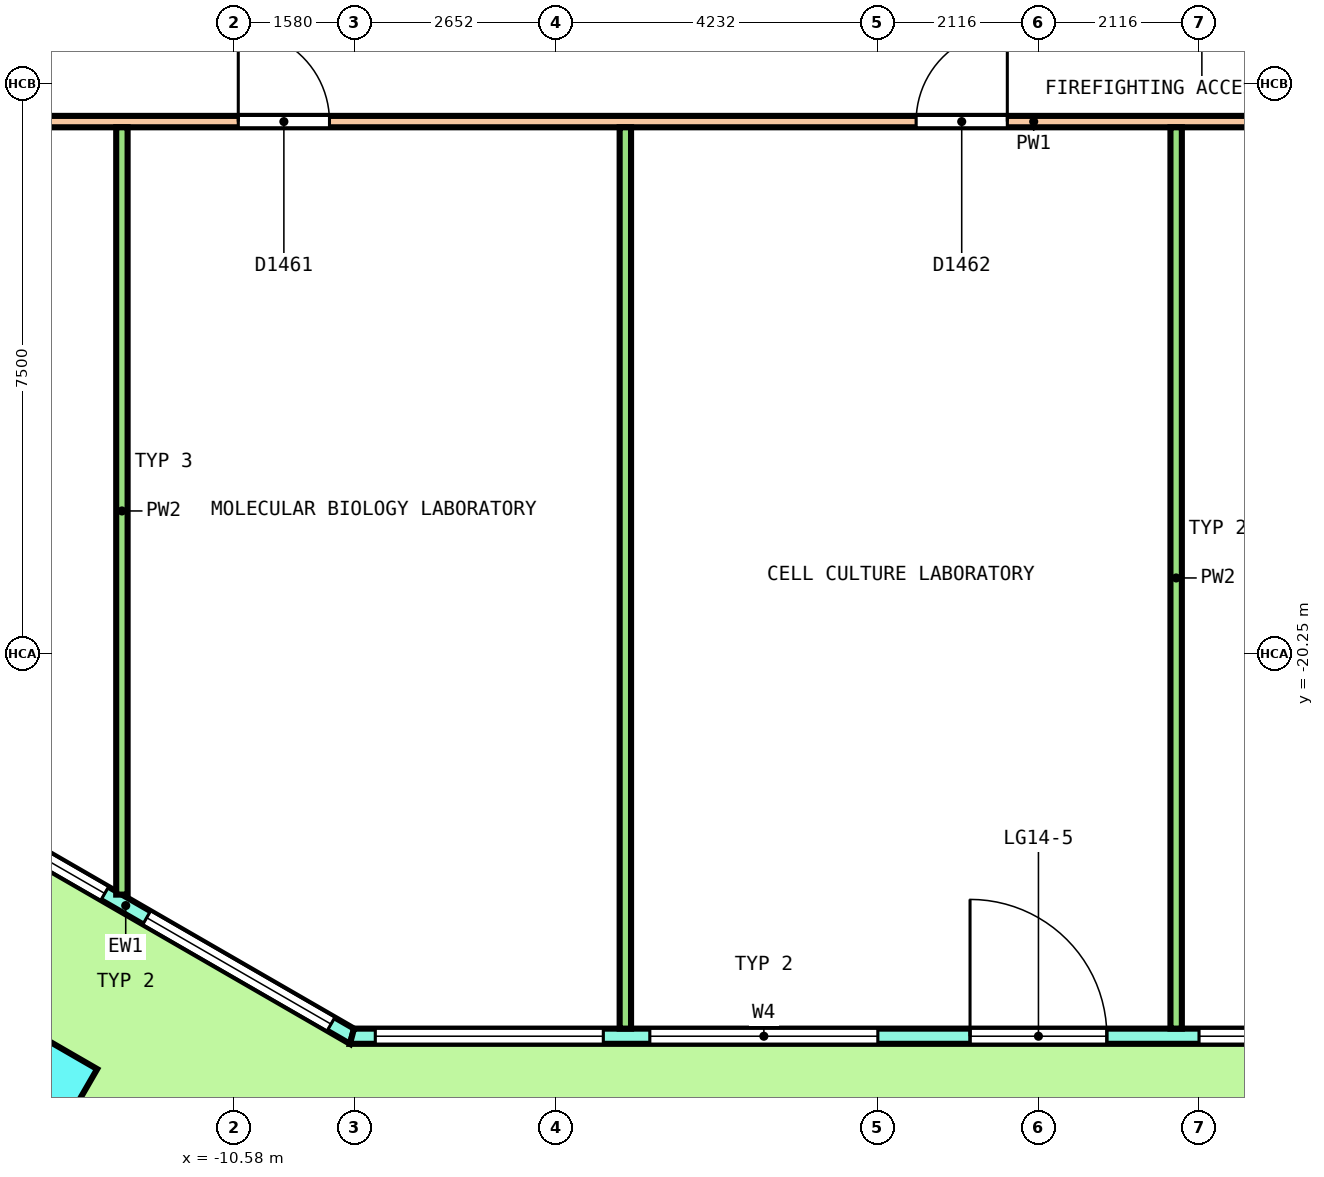
"""IFC4 building model, lengths in metres.
Left out: names, types, materials, properties, quantities, classifications, styles, units other than length and angle.
Written with IfcOpenShell. Run it as: python <this file> out.ifc"""

import sys

from ifc_helpers import new_model, si_unit, direction, frame, frame_2d, origin, origin_2d, place, context, subcontext, project, spatial, polyline, rectangle, outline, extrude, element, fill, save


model = new_model("IFC4")
c1 = context("Model", 3, precision=1e-05, world=origin(), true_north=direction((0.0, 1.0)))
c2 = subcontext(c1, "Body", "Model", "MODEL_VIEW")
j1 = project(units=[si_unit("LENGTHUNIT", "METRE"), si_unit("PLANEANGLEUNIT", "RADIAN")], contexts=[c1])
p1 = place(None, origin())
s1 = spatial("IfcSite", under=j1, at=p1, CompositionType="ELEMENT")
p2 = place(p1, origin())
s2 = spatial("IfcBuilding", under=s1, at=p2, CompositionType="ELEMENT")
p3 = place(p2, frame((0.0, 0.0, 63.0)))
s3 = spatial("IfcBuildingStorey", under=s2, at=p3, CompositionType="ELEMENT", Elevation=63.0)
p4 = place(p3, frame((-13.408, -25.989, 0.0), z_axis=(0.0, 0.0, 1.0), x_axis=(0.866025403784, -0.5, 0.0)))
e1 = element("IfcColumn", 1, at=p4, inside=s3, PredefinedType="COLUMN", context=c2, shape_type="SweptSolid", body=[
    extrude(rectangle(XDim=1.5, YDim=1.5, at=origin_2d()), origin(), (0.0, 0.0, 1.0), 4.04),
])
p5 = place(p3, frame((-14.985, -21.845, 0.0), z_axis=(0.0, 0.0, 1.0), x_axis=(0.866029458321, -0.49999297727, 0.0)))
e2 = element("IfcWall", 2, at=p5, inside=s3, PredefinedType="SOLIDWALL", context=c2, shape_type="SweptSolid", body=[
    extrude(outline(polyline([(-0.027, -0.1), (1.128, -0.1), (2.282, -0.1), (3.437, -0.1), (4.592, -0.1), (5.747, -0.1), (6.901, -0.1), (6.848, 0.1), (5.711, 0.1), (4.574, 0.1), (3.437, 0.1), (2.301, 0.1), (1.164, 0.1), (0.027, 0.1), (-0.027, -0.1)])), origin(), (0.0, 0.0, 1.0), 4.1),
])
p6 = place(p5, frame((0.319, 0.0, 0.1)))
e3 = element("IfcOpeningElement", 3, at=p6, cuts=e2, PredefinedType="OPENING", context=c2, shape_type="SweptSolid", body=[
    extrude(rectangle(XDim=2.8, YDim=2.9, at=frame_2d((1.4, 1.45))), frame((0.0, 0.11, 0.0), z_axis=(0.0, -1.0, 0.0), x_axis=(1.0, 0.0, 0.0)), (0.0, 0.0, 1.0), 0.22),
])
p7 = place(p5, frame((3.756, 0.0, 0.1)))
e4 = element("IfcOpeningElement", 4, at=p7, cuts=e2, PredefinedType="OPENING", context=c2, shape_type="SweptSolid", body=[
    extrude(rectangle(XDim=2.8, YDim=2.9, at=frame_2d((1.4, 1.45))), frame((0.0, 0.11, 0.0), z_axis=(0.0, -1.0, 0.0), x_axis=(1.0, 0.0, 0.0)), (0.0, 0.0, 1.0), 0.22),
])
p8 = place(p3, frame((-9.031, -25.283, 0.0), z_axis=(0.0, 0.0, 1.0), x_axis=(1.0, 0.0, 0.0)))
e5 = element("IfcWall", 5, at=p8, inside=s3, PredefinedType="SOLIDWALL", context=c2, shape_type="SweptSolid", body=[
    extrude(outline(polyline([(-0.027, -0.1), (0.979, -0.1), (1.986, -0.1), (2.992, -0.1), (3.999, -0.1), (5.005, -0.1), (6.012, -0.1), (7.018, -0.1), (8.025, -0.1), (9.031, -0.1), (10.038, -0.1), (11.044, -0.1), (12.051, -0.1), (13.057, -0.1), (14.063, -0.1), (15.07, -0.1), (16.076, -0.1), (17.083, -0.1), (18.089, -0.1), (18.036, 0.1), (17.035, 0.1), (16.035, 0.1), (15.034, 0.1), (14.034, 0.1), (13.033, 0.1), (12.033, 0.1), (11.032, 0.1), (10.032, 0.1), (9.031, 0.1), (8.031, 0.1), (7.03, 0.1), (6.03, 0.1), (5.029, 0.1), (4.029, 0.1), (3.028, 0.1), (2.028, 0.1), (1.027, 0.1), (0.027, 0.1), (-0.027, -0.1)])), origin(), (0.0, 0.0, 1.0), 4.1),
])
p9 = place(p8, frame((0.306, 0.0, 0.1)))
e6 = element("IfcOpeningElement", 6, at=p9, cuts=e5, PredefinedType="OPENING", context=c2, shape_type="SweptSolid", body=[
    extrude(rectangle(XDim=3.0, YDim=2.9, at=frame_2d((1.5, 1.45))), frame((0.0, 0.11, 0.0), z_axis=(0.0, -1.0, 0.0), x_axis=(1.0, 0.0, 0.0)), (0.0, 0.0, 1.0), 0.22),
])
p10 = place(p8, frame((3.919, 0.0, 0.1)))
e7 = element("IfcOpeningElement", 7, at=p10, cuts=e5, PredefinedType="OPENING", context=c2, shape_type="SweptSolid", body=[
    extrude(rectangle(XDim=3.0, YDim=2.9, at=frame_2d((1.5, 1.45))), frame((0.0, 0.11, 0.0), z_axis=(0.0, -1.0, 0.0), x_axis=(1.0, 0.0, 0.0)), (0.0, 0.0, 1.0), 0.22),
])
p11 = place(p8, frame((8.131, 0.0, 0.0)))
e8 = element("IfcOpeningElement", 8, at=p11, cuts=e5, PredefinedType="OPENING", context=c2, shape_type="SweptSolid", body=[
    extrude(rectangle(XDim=1.8, YDim=2.4, at=frame_2d((0.9, 1.2))), frame((0.0, 0.11, 0.0), z_axis=(0.0, -1.0, 0.0), x_axis=(1.0, 0.0, 0.0)), (0.0, 0.0, 1.0), 0.22),
])
p12 = place(p8, frame((8.131, 0.0, 2.55)))
e9 = element("IfcOpeningElement", 9, at=p12, cuts=e5, PredefinedType="OPENING", context=c2, shape_type="SweptSolid", body=[
    extrude(rectangle(XDim=1.8, YDim=0.45, at=frame_2d((0.9, 0.225))), frame((0.0, 0.11, 0.0), z_axis=(0.0, -1.0, 0.0), x_axis=(1.0, 0.0, 0.0)), (0.0, 0.0, 1.0), 0.22),
])
p13 = place(p8, frame((11.144, 0.0, 0.1)))
e10 = element("IfcOpeningElement", 10, at=p13, cuts=e5, PredefinedType="OPENING", context=c2, shape_type="SweptSolid", body=[
    extrude(rectangle(XDim=3.0, YDim=2.9, at=frame_2d((1.5, 1.45))), frame((0.0, 0.11, 0.0), z_axis=(0.0, -1.0, 0.0), x_axis=(1.0, 0.0, 0.0)), (0.0, 0.0, 1.0), 0.22),
])
p14 = place(p8, frame((14.756, 0.0, 0.1)))
e11 = element("IfcOpeningElement", 11, at=p14, cuts=e5, PredefinedType="OPENING", context=c2, shape_type="SweptSolid", body=[
    extrude(rectangle(XDim=3.0, YDim=2.9, at=frame_2d((1.5, 1.45))), frame((0.0, 0.11, 0.0), z_axis=(0.0, -1.0, 0.0), x_axis=(1.0, 0.0, 0.0)), (0.0, 0.0, 1.0), 0.22),
])
p15 = place(p3, frame((-15.725, -13.25, 0.0), z_axis=(0.0, 0.0, 1.0), x_axis=(1.0, 0.0, 0.0)))
e12 = element("IfcWall", 12, at=p15, inside=s3, PredefinedType="PARTITIONING", context=c2, shape_type="SweptSolid", body=[
    extrude(rectangle(XDim=31.325, YDim=0.15, at=frame_2d((15.663, 0.0))), origin(), (0.0, 0.0, 1.0), 3.05),
])
p16 = place(p15, frame((0.898, 0.0, 0.0)))
e13 = element("IfcOpeningElement", 13, at=p16, cuts=e12, PredefinedType="OPENING", context=c2, shape_type="SweptSolid", body=[
    extrude(rectangle(XDim=1.0, YDim=2.1, at=frame_2d((0.5, 1.05))), frame((0.0, 0.085, 0.0), z_axis=(0.0, -1.0, 0.0), x_axis=(1.0, 0.0, 0.0)), (0.0, 0.0, 1.0), 0.17),
])
p17 = place(p15, frame((5.198, 0.0, 0.0)))
e14 = element("IfcOpeningElement", 14, at=p17, cuts=e12, PredefinedType="OPENING", context=c2, shape_type="SweptSolid", body=[
    extrude(rectangle(XDim=1.2, YDim=2.1, at=frame_2d((0.6, 1.05))), frame((0.0, 0.085, 0.0), z_axis=(0.0, -1.0, 0.0), x_axis=(1.0, 0.0, 0.0)), (0.0, 0.0, 1.0), 0.17),
])
p18 = place(p15, frame((14.115, 0.0, 0.0)))
e15 = element("IfcOpeningElement", 15, at=p18, cuts=e12, PredefinedType="OPENING", context=c2, shape_type="SweptSolid", body=[
    extrude(rectangle(XDim=1.2, YDim=2.1, at=frame_2d((0.6, 1.05))), frame((0.0, 0.085, 0.0), z_axis=(0.0, -1.0, 0.0), x_axis=(1.0, 0.0, 0.0)), (0.0, 0.0, 1.0), 0.17),
])
p19 = place(p15, frame((22.046, 0.0, 0.0)))
e16 = element("IfcOpeningElement", 16, at=p19, cuts=e12, PredefinedType="OPENING", context=c2, shape_type="SweptSolid", body=[
    extrude(rectangle(XDim=1.0, YDim=2.1, at=frame_2d((0.5, 1.05))), frame((0.0, 0.085, 0.0), z_axis=(0.0, -1.0, 0.0), x_axis=(1.0, 0.0, 0.0)), (0.0, 0.0, 1.0), 0.17),
])
p20 = place(p15, frame((28.358, 0.0, 0.0)))
e17 = element("IfcOpeningElement", 17, at=p20, cuts=e12, PredefinedType="OPENING", context=c2, shape_type="SweptSolid", body=[
    extrude(rectangle(XDim=1.0, YDim=2.1, at=frame_2d((0.5, 1.05))), frame((0.0, 0.085, 0.0), z_axis=(0.0, -1.0, 0.0), x_axis=(1.0, 0.0, 0.0)), (0.0, 0.0, 1.0), 0.17),
])
p21 = place(p3, frame((-12.058, -23.42, 0.0), z_axis=(0.0, 0.0, 1.0), x_axis=(0.0, 1.0, 0.0)))
e18 = element("IfcWall", 18, at=p21, inside=s3, PredefinedType="PARTITIONING", context=c2, shape_type="SweptSolid", body=[
    extrude(rectangle(XDim=10.095, YDim=0.15, at=frame_2d((5.047, 0.0))), origin(), (0.0, 0.0, 1.0), 3.05),
])
for number, where, z_axis, x_axis in (
    (19, (-5.435, -25.183, 0.0), (0.0, 0.0, 1.0), (0.0, 1.0, 0.0)),
    (20, (1.812, -25.183, 0.0), (0.0, 0.0, 1.0), (0.0, 1.0, 0.0)),
):
    element("IfcWall", number, at=place(p3, frame(where, z_axis=z_axis, x_axis=x_axis)), inside=s3, PredefinedType="PARTITIONING", context=c2, shape_type="SweptSolid", body=[
        extrude(rectangle(XDim=11.858, YDim=0.15, at=frame_2d((5.929, 0.0))), origin(), (0.0, 0.0, 1.0), 3.05),
    ])
p22 = place(p6, origin())
e21 = element("IfcWindow", 21, at=p22, inside=s3, PartitioningType="SINGLE_PANEL", PredefinedType="WINDOW", context=c2, shape_type="SweptSolid", body=[
    extrude(rectangle(XDim=2.8, YDim=2.9, at=frame_2d((1.4, 1.45))), frame((0.0, 0.03, 0.0), z_axis=(0.0, -1.0, 0.0), x_axis=(1.0, 0.0, 0.0)), (0.0, 0.0, 1.0), 0.06),
])
fill(e3, e21)
p23 = place(p7, origin())
e22 = element("IfcWindow", 22, at=p23, inside=s3, PartitioningType="SINGLE_PANEL", PredefinedType="WINDOW", context=c2, shape_type="SweptSolid", body=[
    extrude(rectangle(XDim=2.8, YDim=2.9, at=frame_2d((1.4, 1.45))), frame((0.0, 0.03, 0.0), z_axis=(0.0, -1.0, 0.0), x_axis=(1.0, 0.0, 0.0)), (0.0, 0.0, 1.0), 0.06),
])
fill(e4, e22)
p24 = place(p9, origin())
e23 = element("IfcWindow", 23, at=p24, inside=s3, PartitioningType="SINGLE_PANEL", PredefinedType="WINDOW", context=c2, shape_type="SweptSolid", body=[
    extrude(rectangle(XDim=3.0, YDim=2.9, at=frame_2d((1.5, 1.45))), frame((0.0, 0.03, 0.0), z_axis=(0.0, -1.0, 0.0), x_axis=(1.0, 0.0, 0.0)), (0.0, 0.0, 1.0), 0.06),
])
fill(e6, e23)
p25 = place(p10, origin())
e24 = element("IfcWindow", 24, at=p25, inside=s3, PartitioningType="SINGLE_PANEL", PredefinedType="WINDOW", context=c2, shape_type="SweptSolid", body=[
    extrude(rectangle(XDim=3.0, YDim=2.9, at=frame_2d((1.5, 1.45))), frame((0.0, 0.03, 0.0), z_axis=(0.0, -1.0, 0.0), x_axis=(1.0, 0.0, 0.0)), (0.0, 0.0, 1.0), 0.06),
])
fill(e7, e24)
p26 = place(p11, origin())
e25 = element("IfcDoor", 25, at=p26, inside=s3, OperationType="DOUBLE_DOOR_SINGLE_SWING", PredefinedType="DOOR", context=c2, shape_type="SweptSolid", body=[
    extrude(rectangle(XDim=1.8, YDim=2.4, at=frame_2d((0.9, 1.2))), frame((0.0, 0.025, 0.0), z_axis=(0.0, -1.0, 0.0), x_axis=(1.0, 0.0, 0.0)), (0.0, 0.0, 1.0), 0.05),
])
fill(e8, e25)
p27 = place(p12, origin())
e26 = element("IfcWindow", 26, at=p27, inside=s3, PartitioningType="SINGLE_PANEL", PredefinedType="WINDOW", context=c2, shape_type="SweptSolid", body=[
    extrude(rectangle(XDim=1.8, YDim=0.45, at=frame_2d((0.9, 0.225))), frame((0.0, 0.03, 0.0), z_axis=(0.0, -1.0, 0.0), x_axis=(1.0, 0.0, 0.0)), (0.0, 0.0, 1.0), 0.06),
])
fill(e9, e26)
p28 = place(p13, origin())
e27 = element("IfcWindow", 27, at=p28, inside=s3, PartitioningType="SINGLE_PANEL", PredefinedType="WINDOW", context=c2, shape_type="SweptSolid", body=[
    extrude(rectangle(XDim=3.0, YDim=2.9, at=frame_2d((1.5, 1.45))), frame((0.0, 0.03, 0.0), z_axis=(0.0, -1.0, 0.0), x_axis=(1.0, 0.0, 0.0)), (0.0, 0.0, 1.0), 0.06),
])
fill(e10, e27)
p29 = place(p17, origin())
e28 = element("IfcDoor", 28, at=p29, inside=s3, OperationType="DOUBLE_DOOR_SINGLE_SWING", PredefinedType="DOOR", context=c2, shape_type="SweptSolid", body=[
    extrude(rectangle(XDim=1.2, YDim=2.1, at=frame_2d((0.6, 1.05))), frame((0.0, 0.025, 0.0), z_axis=(0.0, -1.0, 0.0), x_axis=(1.0, 0.0, 0.0)), (0.0, 0.0, 1.0), 0.05),
])
fill(e14, e28)
p30 = place(p18, origin())
e29 = element("IfcDoor", 29, at=p30, inside=s3, OperationType="DOUBLE_DOOR_SINGLE_SWING", PredefinedType="DOOR", context=c2, shape_type="SweptSolid", body=[
    extrude(rectangle(XDim=1.2, YDim=2.1, at=frame_2d((0.6, 1.05))), frame((0.0, 0.025, 0.0), z_axis=(0.0, -1.0, 0.0), x_axis=(1.0, 0.0, 0.0)), (0.0, 0.0, 1.0), 0.05),
])
fill(e15, e29)
save(model, sys.argv[1])
